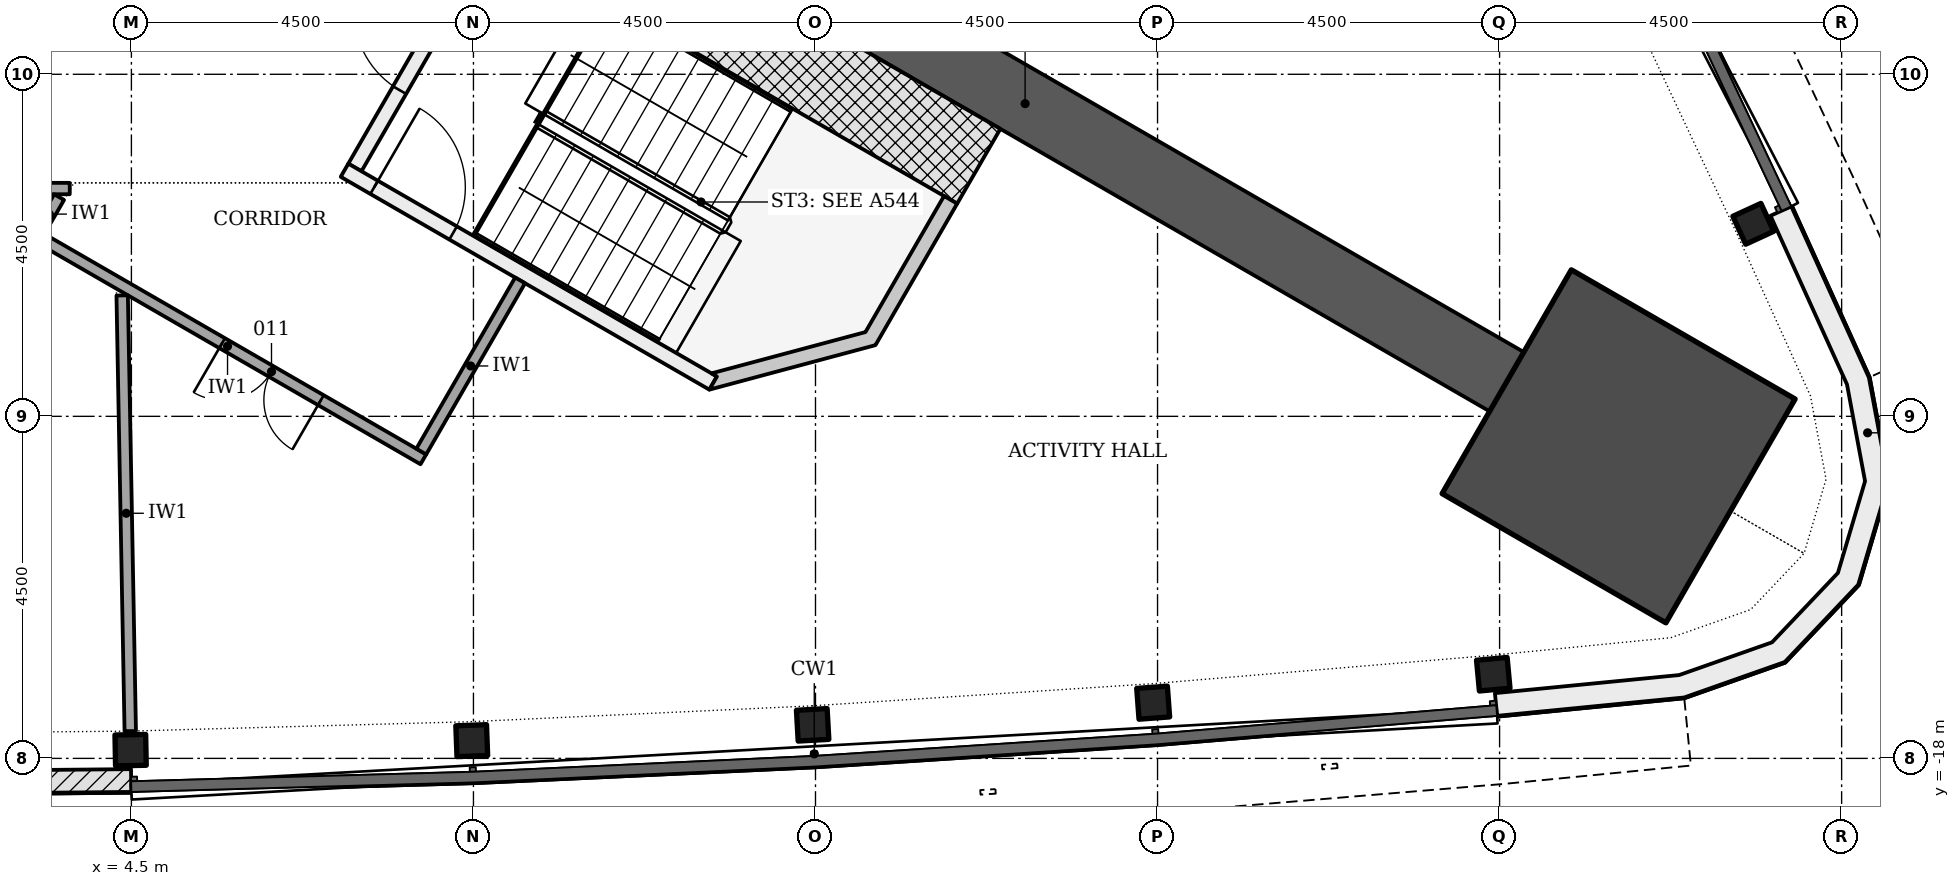
"""IFC4 building model, lengths in metres.
Left out: names, types, materials, properties, quantities, classifications, styles, units other than length and angle.
Written with IfcOpenShell. Run it as: python <this file> out.ifc"""

import sys

from ifc_helpers import new_model, si_unit, direction, frame, frame_2d, origin, origin_2d, place, context, subcontext, project, spatial, polyline, rectangle, i_section, outline, extrude, element, fill, save


model = new_model("IFC4")
c1 = context("Model", 3, precision=1e-05, world=origin(), true_north=direction((0.0, 1.0)))
c2 = subcontext(c1, "Body", "Model", "MODEL_VIEW")
j1 = project(units=[si_unit("LENGTHUNIT", "METRE"), si_unit("PLANEANGLEUNIT", "RADIAN")], contexts=[c1])
p1 = place(None, origin())
s1 = spatial("IfcSite", under=j1, at=p1, CompositionType="ELEMENT")
p2 = place(p1, origin())
s2 = spatial("IfcBuilding", under=s1, at=p2, CompositionType="ELEMENT")
p3 = place(p2, frame((0.0, 0.0, 24.0)))
s3 = spatial("IfcBuildingStorey", under=s2, at=p3, CompositionType="ELEMENT", Elevation=24.0)
p4 = place(p3, frame((9.922, -5.728, -0.2), z_axis=(0.0, 0.0, 1.0), x_axis=(0.866028046028, -0.499995423472, 0.0)))
e1 = element("IfcWall", 1, at=p4, inside=s3, PredefinedType="SHEAR", context=c2, shape_type="SweptSolid", body=[
    extrude(rectangle(XDim=14.633, YDim=0.9, at=frame_2d((7.316, 0.0))), origin(), (0.0, 0.0, 1.0), 3.6),
])
p5 = place(p3, frame((24.066, -13.895, -0.2), z_axis=(0.0, 0.0, 1.0), x_axis=(0.866025403784, -0.5, 0.0)))
e2 = element("IfcColumn", 2, at=p5, inside=s3, PredefinedType="COLUMN", context=c2, shape_type="SweptSolid", body=[
    extrude(rectangle(XDim=3.4, YDim=3.4, at=origin_2d()), origin(), (0.0, 0.0, 1.0), 3.6),
])
for number, where, z_axis, x_axis in (
    (3, (4.49, -17.892, -0.2), (0.0, 0.0, 1.0), (1.0, 0.019, 0.0)),
    (4, (8.978, -17.767, -0.2), (0.0, 0.0, 1.0), (0.999, 0.037, 0.0)),
    (5, (13.462, -17.558, -0.2), (0.0, 0.0, 1.0), (0.998, 0.056, 0.0)),
    (6, (17.943, -17.267, -0.2), (0.0, 0.0, 1.0), (0.997, 0.074, 0.0)),
    (7, (22.417, -16.893, -0.2), (0.0, 0.0, 1.0), (0.996, 0.093, 0.0)),
    (8, (25.838, -10.967, -0.2), (0.0, 0.0, 1.0), (-0.418, 0.909, 0.0)),
):
    element("IfcColumn", number, at=place(p3, frame(where, z_axis=z_axis, x_axis=x_axis)), inside=s3, PredefinedType="COLUMN", context=c2, shape_type="SweptSolid", body=[
        extrude(i_section(OverallWidth=0.404, OverallDepth=0.406, WebThickness=0.027, FlangeThickness=0.044, FilletRadius=0.015, at=origin_2d()), origin(), (0.0, 0.0, 1.0), 3.6),
    ])
p6 = place(p3, frame((4.496, -18.292, 0.0), z_axis=(0.0, 0.0, 1.0), x_axis=(-0.999956888742, -0.0092855079, 0.0)))
e9 = element("IfcWall", 9, at=p6, inside=s3, PredefinedType="NOTDEFINED", context=c2, shape_type="SweptSolid", body=[
    extrude(rectangle(XDim=4.496, YDim=0.3, at=frame_2d((2.248, 0.0))), origin(), (0.0, 0.0, 1.0), 3.3),
])
p7 = place(p6, frame((1.648, 0.0, 0.0)))
e10 = element("IfcOpeningElement", 10, at=p7, cuts=e9, PredefinedType="OPENING", context=c2, shape_type="SweptSolid", body=[
    extrude(rectangle(XDim=1.2, YDim=2.4, at=frame_2d((0.6, 1.2))), frame((0.0, 0.16, 0.0), z_axis=(0.0, -1.0, 0.0), x_axis=(1.0, 0.0, 0.0)), (0.0, 0.0, 1.0), 0.32),
])
p8 = place(p3, origin())
e11 = element("IfcWall", 11, at=p8, inside=s3, PredefinedType="NOTDEFINED", context=c2, shape_type="SweptSolid", body=[
    extrude(outline(polyline([(22.468, -17.44), (24.929, -17.199), (26.252, -16.732), (27.218, -15.715), (27.616, -14.369), (27.359, -12.99), (26.338, -10.738), (26.064, -10.861), (27.071, -13.08), (27.308, -14.353), (26.951, -15.56), (26.084, -16.473), (24.863, -16.904), (22.438, -17.142), (22.468, -17.44)])), origin(), (0.0, 0.0, 1.0), 3.3),
])
p9 = place(p3, frame((7.44, -10.226, -0.2), z_axis=(0.0, 0.0, 1.0), x_axis=(0.500022077904, 0.866012656725, 0.0)))
e12 = element("IfcWall", 12, at=p9, inside=s3, PredefinedType="SHEAR", context=c2, shape_type="SweptSolid", body=[
    extrude(rectangle(XDim=3.55, YDim=0.2, at=frame_2d((1.775, 0.0))), origin(), (0.0, 0.0, 1.0), 3.6),
])
p10 = place(p9, frame((1.175, 0.0, 0.2)))
e13 = element("IfcOpeningElement", 13, at=p10, cuts=e12, PredefinedType="OPENING", context=c2, shape_type="SweptSolid", body=[
    extrude(rectangle(XDim=1.2, YDim=2.1, at=frame_2d((0.6, 1.05))), frame((0.0, 0.11, 0.0), z_axis=(0.0, -1.0, 0.0), x_axis=(1.0, 0.0, 0.0)), (0.0, 0.0, 1.0), 0.22),
])
p11 = place(p3, frame((7.304, -10.262, -0.2), z_axis=(0.0, 0.0, 1.0), x_axis=(0.866026594901, -0.49999793692, 0.0)))
e14 = element("IfcWall", 14, at=p11, inside=s3, PredefinedType="SHEAR", context=c2, shape_type="SweptSolid", body=[
    extrude(rectangle(XDim=5.6, YDim=0.2, at=frame_2d((2.8, 0.0))), origin(), (0.0, 0.0, 1.0), 3.6),
])
p12 = place(p11, frame((0.45, 0.0, 0.2)))
e15 = element("IfcOpeningElement", 15, at=p12, cuts=e14, PredefinedType="OPENING", context=c2, shape_type="SweptSolid", body=[
    extrude(rectangle(XDim=1.2, YDim=2.1, at=frame_2d((0.6, 1.05))), frame((0.0, 0.11, 0.0), z_axis=(0.0, -1.0, 0.0), x_axis=(1.0, 0.0, 0.0)), (0.0, 0.0, 1.0), 0.22),
])
p13 = place(p3, frame((9.413, -6.61, -0.2), z_axis=(0.0, 0.0, 1.0), x_axis=(0.866018442252, -0.500012057535, 0.0)))
e16 = element("IfcWall", 16, at=p13, inside=s3, PredefinedType="SHEAR", context=c2, shape_type="SweptSolid", body=[
    extrude(rectangle(XDim=7.2, YDim=1.136, at=frame_2d((3.6, 0.0))), origin(), (0.0, 0.0, 1.0), 3.6),
])
p14 = place(p3, frame((0.0, 0.0, -0.2)))
e17 = element("IfcWall", 17, at=p14, inside=s3, PredefinedType="SHEAR", context=c2, shape_type="SweptSolid", body=[
    extrude(outline(polyline([(12.104, -13.149), (14.289, -12.563), (15.364, -10.701), (15.191, -10.601), (14.157, -12.392), (12.132, -12.934), (12.204, -12.976), (12.204, -12.976), (12.204, -12.976), (12.204, -12.976), (12.204, -12.976), (12.204, -12.976), (12.204, -12.976), (12.204, -12.976), (12.204, -12.976), (12.204, -12.976), (12.204, -12.976), (12.204, -12.976), (12.204, -12.976), (12.204, -12.976), (12.204, -12.976), (12.204, -12.976), (12.204, -12.976), (12.104, -13.149)])), origin(), (0.0, 0.0, 1.0), 3.6),
])
p15 = place(p3, frame((3.689, -10.503, 0.0), z_axis=(0.0, 0.0, 1.0), x_axis=(-1.0, 0.0, 0.0)))
e18 = element("IfcWall", 18, at=p15, inside=s3, PredefinedType="PARTITIONING", context=c2, shape_type="SweptSolid", body=[
    extrude(rectangle(XDim=13.068, YDim=0.15, at=frame_2d((6.534, 0.0))), origin(), (0.0, 0.0, 1.0), 2.768),
])
p16 = place(p15, frame((10.646, 0.0, 0.0)))
e19 = element("IfcOpeningElement", 19, at=p16, cuts=e18, PredefinedType="OPENING", context=c2, shape_type="SweptSolid", body=[
    extrude(rectangle(XDim=1.0, YDim=2.1, at=frame_2d((0.5, 1.05))), frame((0.0, 0.085, 0.0), z_axis=(0.0, -1.0, 0.0), x_axis=(1.0, 0.0, 0.0)), (0.0, 0.0, 1.0), 0.17),
])
p17 = place(p15, frame((8.118, 0.0, 0.0)))
e20 = element("IfcOpeningElement", 20, at=p17, cuts=e18, PredefinedType="OPENING", context=c2, shape_type="SweptSolid", body=[
    extrude(rectangle(XDim=1.0, YDim=2.1, at=frame_2d((0.5, 1.05))), frame((0.0, 0.085, 0.0), z_axis=(0.0, -1.0, 0.0), x_axis=(1.0, 0.0, 0.0)), (0.0, 0.0, 1.0), 0.17),
])
p18 = place(p15, frame((2.986, 0.0, 0.0)))
e21 = element("IfcOpeningElement", 21, at=p18, cuts=e18, PredefinedType="OPENING", context=c2, shape_type="SweptSolid", body=[
    extrude(rectangle(XDim=1.5, YDim=2.1, at=frame_2d((0.75, 1.05))), frame((0.0, 0.085, 0.0), z_axis=(0.0, -1.0, 0.0), x_axis=(1.0, 0.0, 0.0)), (0.0, 0.0, 1.0), 0.17),
])
p19 = place(p3, frame((8.341, -14.066, 0.0), z_axis=(0.0, 0.0, 1.0), x_axis=(-0.866017493347, 0.500013701029, 0.0)))
e22 = element("IfcWall", 22, at=p19, inside=s3, PredefinedType="PARTITIONING", context=c2, shape_type="SweptSolid", body=[
    extrude(rectangle(XDim=5.95, YDim=0.15, at=frame_2d((2.975, 0.0))), origin(), (0.0, 0.0, 1.0), 2.768),
])
p20 = place(p19, frame((1.557, 0.0, 0.0)))
e23 = element("IfcOpeningElement", 23, at=p20, cuts=e22, PredefinedType="OPENING", context=c2, shape_type="SweptSolid", body=[
    extrude(rectangle(XDim=1.5, YDim=2.1, at=frame_2d((0.75, 1.05))), frame((0.0, 0.085, 0.0), z_axis=(0.0, -1.0, 0.0), x_axis=(1.0, 0.0, 0.0)), (0.0, 0.0, 1.0), 0.17),
])
p21 = place(p3, frame((8.314, -13.963, 0.0), z_axis=(0.0, 0.0, 1.0), x_axis=(0.499936506574, 0.866062058628, 0.0)))
e24 = element("IfcWall", 24, at=p21, inside=s3, PredefinedType="PARTITIONING", context=c2, shape_type="SweptSolid", body=[
    extrude(rectangle(XDim=2.6, YDim=0.15, at=frame_2d((1.3, 0.0))), origin(), (0.0, 0.0, 1.0), 2.923),
])
p22 = place(p3, frame((3.291, -11.063, 0.0), z_axis=(0.0, 0.0, 1.0), x_axis=(0.499899694197, 0.866083307622, 0.0)))
e25 = element("IfcWall", 25, at=p22, inside=s3, PredefinedType="PARTITIONING", context=c2, shape_type="SweptSolid", body=[
    extrude(rectangle(XDim=0.517, YDim=0.15, at=frame_2d((0.258, 0.0))), origin(), (0.0, 0.0, 1.0), 3.4),
])
p23 = place(p3, frame((4.485, -17.642, 0.0), z_axis=(0.0, 0.0, 1.0), x_axis=(-0.018565794352, 0.999827640786, 0.0)))
e26 = element("IfcWall", 26, at=p23, inside=s3, PredefinedType="PARTITIONING", context=c2, shape_type="SweptSolid", body=[
    extrude(rectangle(XDim=5.733, YDim=0.15, at=frame_2d((2.867, 0.0))), origin(), (0.0, 0.0, 1.0), 2.768),
])
p24 = place(p10, origin())
e27 = element("IfcDoor", 27, at=p24, inside=s3, OperationType="SINGLE_SWING_RIGHT", PredefinedType="DOOR", context=c2, shape_type="SweptSolid", body=[
    extrude(rectangle(XDim=1.2, YDim=2.1, at=frame_2d((0.6, 1.05))), frame((0.0, 0.025, 0.0), z_axis=(0.0, -1.0, 0.0), x_axis=(1.0, 0.0, 0.0)), (0.0, 0.0, 1.0), 0.05),
])
fill(e13, e27)
p25 = place(p12, origin())
e28 = element("IfcDoor", 28, at=p25, inside=s3, OperationType="SINGLE_SWING_LEFT", PredefinedType="DOOR", context=c2, shape_type="SweptSolid", body=[
    extrude(rectangle(XDim=1.2, YDim=2.1, at=frame_2d((0.6, 1.05))), frame((0.0, 0.025, 0.0), z_axis=(0.0, -1.0, 0.0), x_axis=(1.0, 0.0, 0.0)), (0.0, 0.0, 1.0), 0.05),
])
fill(e15, e28)
p26 = place(p20, origin())
e29 = element("IfcDoor", 29, at=p26, inside=s3, OperationType="DOUBLE_DOOR_SINGLE_SWING", PredefinedType="DOOR", context=c2, shape_type="SweptSolid", body=[
    extrude(rectangle(XDim=1.5, YDim=2.1, at=frame_2d((0.75, 1.05))), frame((0.0, 0.025, 0.0), z_axis=(0.0, -1.0, 0.0), x_axis=(1.0, 0.0, 0.0)), (0.0, 0.0, 1.0), 0.05),
])
fill(e23, e29)
save(model, sys.argv[1])
